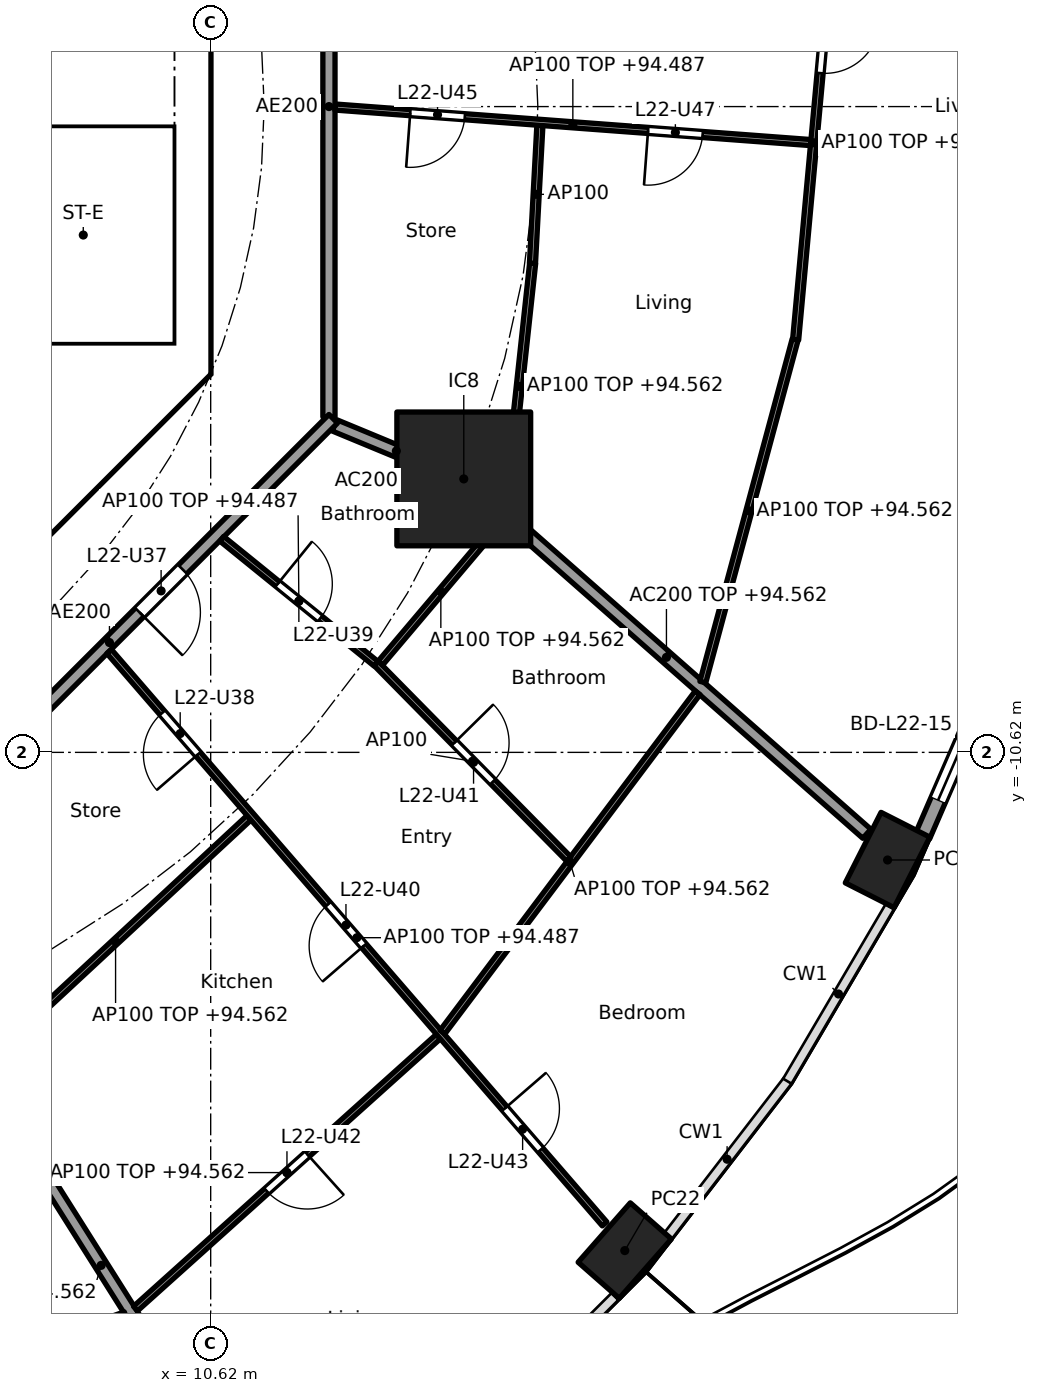
"""IFC4 building model, lengths in metres.
Left out: names, types, materials, properties, quantities, classifications, styles, units other than length and angle.
Written with IfcOpenShell. Run it as: python <this file> out.ifc"""

import sys

from ifc_helpers import new_model, si_unit, direction, frame, frame_2d, origin, origin_2d, place, context, subcontext, project, spatial, polyline, rectangle, hollow_rectangle, outline, extrude, element, fill, save


model = new_model("IFC4")
c1 = context("Model", 3, precision=1e-05, world=origin(), true_north=direction((0.0, 1.0)))
c2 = subcontext(c1, "Body", "Model", "MODEL_VIEW")
j1 = project(units=[si_unit("LENGTHUNIT", "METRE"), si_unit("PLANEANGLEUNIT", "RADIAN")], contexts=[c1])
p1 = place(None, origin())
s1 = spatial("IfcSite", under=j1, at=p1, CompositionType="ELEMENT")
p2 = place(p1, origin())
s2 = spatial("IfcBuilding", under=s1, at=p2, CompositionType="ELEMENT")
p3 = place(p2, frame((0.0, 0.0, 91.8)))
s3 = spatial("IfcBuildingStorey", under=s2, at=p3, CompositionType="ELEMENT", Elevation=91.8)
for number, where, z_axis, x_axis in (
    (1, (17.43, -18.813, 0.0), (0.0, 0.0, 1.0), (0.66, 0.751, 0.0)),
    (2, (21.751, -12.39, 0.0), (0.0, 0.0, 1.0), (0.452, 0.892, 0.0)),
):
    element("IfcColumn", number, at=place(p3, frame(where, z_axis=z_axis, x_axis=x_axis)), inside=s3, PredefinedType="COLUMN", context=c2, shape_type="SweptSolid", body=[
        extrude(hollow_rectangle(XDim=1.3, YDim=0.9, WallThickness=0.045, at=origin_2d()), origin(), (0.0, 0.0, 1.0), 3.7),
    ])
p4 = place(p3, frame((14.782, -6.123, 0.0), z_axis=(0.0, 0.0, 1.0), x_axis=(1.0, 0.0, 0.0)))
e3 = element("IfcColumn", 3, at=p4, inside=s3, PredefinedType="COLUMN", context=c2, shape_type="SweptSolid", body=[
    extrude(rectangle(XDim=2.2, YDim=2.2, at=origin_2d()), origin(), (0.0, 0.0, 1.0), 3.7),
])
p5 = place(p3, frame((23.672, -8.893, 0.0), z_axis=(0.0, 0.0, 1.0), x_axis=(-0.397621629246, -0.917549475481, 0.0)))
e4 = element("IfcWall", 4, at=p5, inside=s3, PredefinedType="SOLIDWALL", context=c2, shape_type="SweptSolid", body=[
    extrude(rectangle(XDim=3.379, YDim=0.25, at=frame_2d((1.69, 0.0))), origin(), (0.0, 0.0, 1.0), 3.44),
])
p6 = place(p5, frame((0.64, 0.0, 0.0)))
e5 = element("IfcOpeningElement", 5, at=p6, cuts=e4, PredefinedType="OPENING", context=c2, shape_type="SweptSolid", body=[
    extrude(rectangle(XDim=2.1, YDim=2.4, at=frame_2d((1.05, 1.2))), frame((0.0, 0.135, 0.0), z_axis=(0.0, -1.0, 0.0), x_axis=(1.0, 0.0, 0.0)), (0.0, 0.0, 1.0), 0.27),
])
p7 = place(p3, frame((4.613, -9.988, 0.0), z_axis=(0.0, 0.0, 1.0), x_axis=(0.707106781187, 0.707106781187, 0.0)))
e6 = element("IfcWall", 6, at=p7, inside=s3, PredefinedType="SHEAR", context=c2, shape_type="SweptSolid", body=[
    extrude(rectangle(XDim=7.602, YDim=0.6, at=frame_2d((3.801, 0.0))), origin(), (0.0, 0.0, 1.0), 3.44),
])
p8 = place(p7, frame((3.201, 0.0, 0.0)))
e7 = element("IfcOpeningElement", 7, at=p8, cuts=e6, PredefinedType="OPENING", context=c2, shape_type="SweptSolid", body=[
    extrude(rectangle(XDim=1.2, YDim=2.1, at=frame_2d((0.6, 1.05))), frame((0.0, 0.31, 0.0), z_axis=(0.0, -1.0, 0.0), x_axis=(1.0, 0.0, 0.0)), (0.0, 0.0, 1.0), 0.62),
])
p9 = place(p3, origin())
e8 = element("IfcWall", 8, at=p9, inside=s3, PredefinedType="SHEAR", context=c2, shape_type="SweptSolid", body=[
    extrude(outline(polyline([(9.776, -4.401), (10.025, -4.152), (10.025, -3.801), (10.025, 4.152), (9.776, 4.401), (10.2, 4.825), (10.625, 4.401), (10.625, -4.401), (10.2, -4.825), (9.776, -4.401)])), origin(), (0.0, 0.0, 1.0), 3.44),
])
p10 = place(p3, origin())
e9 = element("IfcWall", 9, at=p10, inside=s3, PredefinedType="SOLIDWALL", context=c2, shape_type="SweptSolid", body=[
    extrude(outline(polyline([(10.025, -4.1), (6.7, -4.1), (6.7, -3.9), (10.025, -3.9), (10.025, -4.1)])), origin(), (0.0, 0.0, 1.0), 3.44),
])
p11 = place(p3, frame((6.15, -14.824, 0.0), z_axis=(0.0, 0.0, 1.0), x_axis=(0.533492589682, -0.845804739142, 0.0)))
e10 = element("IfcWall", 10, at=p11, inside=s3, PredefinedType="PARTITIONING", context=c2, shape_type="SweptSolid", body=[
    extrude(rectangle(XDim=10.006, YDim=0.2, at=frame_2d((5.003, 0.0))), origin(), (0.0, 0.0, 1.0), 2.762),
])
p12 = place(p3, frame((12.657, -5.243, 0.0), z_axis=(0.0, 0.0, 1.0), x_axis=(0.923876145736, -0.382691608661, 0.0)))
e11 = element("IfcWall", 11, at=p12, inside=s3, PredefinedType="PARTITIONING", context=c2, shape_type="SweptSolid", body=[
    extrude(rectangle(XDim=2.2, YDim=0.2, at=frame_2d((1.1, 0.0))), origin(), (0.0, 0.0, 1.0), 3.44),
])
p13 = place(p3, frame((14.82, -6.156, 0.0), z_axis=(0.0, 0.0, 1.0), x_axis=(0.750582231659, -0.660777052808, 0.0)))
e12 = element("IfcWall", 12, at=p13, inside=s3, PredefinedType="PARTITIONING", context=c2, shape_type="SweptSolid", body=[
    extrude(rectangle(XDim=8.781, YDim=0.2, at=frame_2d((4.391, 0.0))), origin(), (0.0, 0.0, 1.0), 2.762),
])
p14 = place(p3, frame((12.565, -5.104, 0.0), z_axis=(0.0, 0.0, 1.0), x_axis=(0.0, 1.0, 0.0)))
e13 = element("IfcWall", 13, at=p14, inside=s3, PredefinedType="PARTITIONING", context=c2, shape_type="SweptSolid", body=[
    extrude(rectangle(XDim=10.209, YDim=0.2, at=frame_2d((5.104, 0.0))), origin(), (0.0, 0.0, 1.0), 3.44),
])
p15 = place(p14, frame((6.339, 0.0, 0.0)))
e14 = element("IfcOpeningElement", 14, at=p15, cuts=e13, PredefinedType="OPENING", context=c2, shape_type="SweptSolid", body=[
    extrude(rectangle(XDim=1.0, YDim=2.1, at=frame_2d((0.5, 1.05))), frame((0.0, 0.11, 0.0), z_axis=(0.0, -1.0, 0.0), x_axis=(1.0, 0.0, 0.0)), (0.0, 0.0, 1.0), 0.22),
])
p16 = place(p3, frame((5.275, -12.494, 0.0), z_axis=(0.0, 0.0, 1.0), x_axis=(0.707106781187, 0.707106781187, 0.0)))
e15 = element("IfcWall", 15, at=p16, inside=s3, PredefinedType="PARTITIONING", context=c2, shape_type="SweptSolid", body=[
    extrude(rectangle(XDim=10.409, YDim=0.2, at=frame_2d((5.205, 0.0))), origin(), (0.0, 0.0, 1.0), 3.44),
])
p17 = place(p16, frame((5.906, 0.0, 0.0)))
e16 = element("IfcOpeningElement", 16, at=p17, cuts=e15, PredefinedType="OPENING", context=c2, shape_type="SweptSolid", body=[
    extrude(rectangle(XDim=1.0, YDim=2.1, at=frame_2d((0.5, 1.05))), frame((0.0, 0.11, 0.0), z_axis=(0.0, -1.0, 0.0), x_axis=(1.0, 0.0, 0.0)), (0.0, 0.0, 1.0), 0.22),
])
p18 = place(p3, frame((20.834, 2.642, 0.0), z_axis=(0.0, 0.0, 1.0), x_axis=(-0.091385407685, -0.995815599025, 0.0)))
e17 = element("IfcWall", 17, at=p18, inside=s3, PredefinedType="PARTITIONING", context=c2, shape_type="SweptSolid", body=[
    extrude(rectangle(XDim=6.502, YDim=0.1, at=frame_2d((3.251, 0.0))), origin(), (0.0, 0.0, 1.0), 2.762),
])
p19 = place(p18, frame((1.201, 0.0, 0.0)))
e18 = element("IfcOpeningElement", 18, at=p19, cuts=e17, PredefinedType="OPENING", context=c2, shape_type="SweptSolid", body=[
    extrude(rectangle(XDim=0.9, YDim=2.1, at=frame_2d((0.45, 1.05))), frame((0.0, 0.06, 0.0), z_axis=(0.0, -1.0, 0.0), x_axis=(1.0, 0.0, 0.0)), (0.0, 0.0, 1.0), 0.12),
])
p20 = place(p3, frame((4.034, -21.698, 0.0), z_axis=(0.0, 0.0, 1.0), x_axis=(0.942861482644, 0.33318497047, 0.0)))
e19 = element("IfcWall", 19, at=p20, inside=s3, PredefinedType="PARTITIONING", context=c2, shape_type="SweptSolid", body=[
    extrude(rectangle(XDim=5.495, YDim=0.1, at=frame_2d((2.748, 0.0))), origin(), (0.0, 0.0, 1.0), 2.762),
])
p21 = place(p20, frame((2.297, 0.0, 0.0)))
e20 = element("IfcOpeningElement", 20, at=p21, cuts=e19, PredefinedType="OPENING", context=c2, shape_type="SweptSolid", body=[
    extrude(rectangle(XDim=0.9, YDim=2.1, at=frame_2d((0.45, 1.05))), frame((0.0, 0.06, 0.0), z_axis=(0.0, -1.0, 0.0), x_axis=(1.0, 0.0, 0.0)), (0.0, 0.0, 1.0), 0.12),
])
p22 = place(p3, frame((6.861, -15.768, 0.0), z_axis=(0.0, 0.0, 1.0), x_axis=(0.733011256509, 0.680216508056, 0.0)))
e21 = element("IfcWall", 21, at=p22, inside=s3, PredefinedType="PARTITIONING", context=c2, shape_type="SweptSolid", body=[
    extrude(rectangle(XDim=5.989, YDim=0.1, at=frame_2d((2.994, 0.0))), origin(), (0.0, 0.0, 1.0), 2.762),
])
p23 = place(p3, frame((9.384, -19.768, 0.0), z_axis=(0.0, 0.0, 1.0), x_axis=(0.74387407395, 0.668319805262, 0.0)))
e22 = element("IfcWall", 22, at=p23, inside=s3, PredefinedType="PARTITIONING", context=c2, shape_type="SweptSolid", body=[
    extrude(rectangle(XDim=6.695, YDim=0.1, at=frame_2d((3.348, 0.0))), origin(), (0.0, 0.0, 1.0), 2.762),
])
p24 = place(p23, frame((2.898, 0.0, 0.0)))
e23 = element("IfcOpeningElement", 23, at=p24, cuts=e22, PredefinedType="OPENING", context=c2, shape_type="SweptSolid", body=[
    extrude(rectangle(XDim=0.9, YDim=2.1, at=frame_2d((0.45, 1.05))), frame((0.0, 0.06, 0.0), z_axis=(0.0, -1.0, 0.0), x_axis=(1.0, 0.0, 0.0)), (0.0, 0.0, 1.0), 0.12),
])
p25 = place(p3, frame((8.95, -8.96, 0.0), z_axis=(0.0, 0.0, 1.0), x_axis=(0.65441081073, -0.756139200676, 0.0)))
e24 = element("IfcWall", 24, at=p25, inside=s3, PredefinedType="PARTITIONING", context=c2, shape_type="SweptSolid", body=[
    extrude(rectangle(XDim=12.451, YDim=0.1, at=frame_2d((6.226, 0.0))), origin(), (0.0, 0.0, 1.0), 2.687),
])
p26 = place(p25, frame((1.336, 0.0, 0.0)))
e25 = element("IfcOpeningElement", 25, at=p26, cuts=e24, PredefinedType="OPENING", context=c2, shape_type="SweptSolid", body=[
    extrude(rectangle(XDim=0.9, YDim=2.1, at=frame_2d((0.45, 1.05))), frame((0.0, 0.06, 0.0), z_axis=(0.0, -1.0, 0.0), x_axis=(1.0, 0.0, 0.0)), (0.0, 0.0, 1.0), 0.12),
])
p27 = place(p25, frame((5.501, 0.0, 0.0)))
e26 = element("IfcOpeningElement", 26, at=p27, cuts=e24, PredefinedType="OPENING", context=c2, shape_type="SweptSolid", body=[
    extrude(rectangle(XDim=0.9, YDim=2.1, at=frame_2d((0.45, 1.05))), frame((0.0, 0.06, 0.0), z_axis=(0.0, -1.0, 0.0), x_axis=(1.0, 0.0, 0.0)), (0.0, 0.0, 1.0), 0.12),
])
p28 = place(p25, frame((9.941, 0.0, 0.0)))
e27 = element("IfcOpeningElement", 27, at=p28, cuts=e24, PredefinedType="OPENING", context=c2, shape_type="SweptSolid", body=[
    extrude(rectangle(XDim=0.9, YDim=2.1, at=frame_2d((0.45, 1.05))), frame((0.0, 0.06, 0.0), z_axis=(0.0, -1.0, 0.0), x_axis=(1.0, 0.0, 0.0)), (0.0, 0.0, 1.0), 0.12),
])
p29 = place(p3, frame((14.432, -15.219, 0.0), z_axis=(0.0, 0.0, 1.0), x_axis=(0.601001256685, 0.799248077548, 0.0)))
e28 = element("IfcWall", 28, at=p29, inside=s3, PredefinedType="PARTITIONING", context=c2, shape_type="SweptSolid", body=[
    extrude(rectangle(XDim=6.98, YDim=0.1, at=frame_2d((3.49, 0.0))), origin(), (0.0, 0.0, 1.0), 2.762),
])
p30 = place(p3, frame((10.802, -7.107, 0.0), z_axis=(0.0, 0.0, 1.0), x_axis=(0.776992142502, -0.62951029419, 0.0)))
e29 = element("IfcWall", 29, at=p30, inside=s3, PredefinedType="PARTITIONING", context=c2, shape_type="SweptSolid", body=[
    extrude(rectangle(XDim=3.263, YDim=0.1, at=frame_2d((1.631, 0.0))), origin(), (0.0, 0.0, 1.0), 2.687),
])
p31 = place(p30, frame((1.181, 0.0, 0.0)))
e30 = element("IfcOpeningElement", 30, at=p31, cuts=e29, PredefinedType="OPENING", context=c2, shape_type="SweptSolid", body=[
    extrude(rectangle(XDim=0.9, YDim=2.1, at=frame_2d((0.45, 1.05))), frame((0.0, 0.06, 0.0), z_axis=(0.0, -1.0, 0.0), x_axis=(1.0, 0.0, 0.0)), (0.0, 0.0, 1.0), 0.12),
])
p32 = place(p3, frame((13.341, -9.157, 0.0), z_axis=(0.0, 0.0, 1.0), x_axis=(0.701624526877, -0.712546856904, 0.0)))
e31 = element("IfcWall", 31, at=p32, inside=s3, PredefinedType="PARTITIONING", context=c2, shape_type="SweptSolid", body=[
    extrude(rectangle(XDim=4.515, YDim=0.1, at=frame_2d((2.258, 0.0))), origin(), (0.0, 0.0, 1.0), 3.44),
])
p33 = place(p32, frame((1.833, 0.0, 0.0)))
e32 = element("IfcOpeningElement", 32, at=p33, cuts=e31, PredefinedType="OPENING", context=c2, shape_type="SweptSolid", body=[
    extrude(rectangle(XDim=0.9, YDim=2.1, at=frame_2d((0.45, 1.05))), frame((0.0, 0.06, 0.0), z_axis=(0.0, -1.0, 0.0), x_axis=(1.0, 0.0, 0.0)), (0.0, 0.0, 1.0), 0.12),
])
p34 = place(p3, frame((13.409, -9.155, 0.0), z_axis=(0.0, 0.0, 1.0), x_axis=(0.646130325831, 0.763227097293, 0.0)))
e33 = element("IfcWall", 33, at=p34, inside=s3, PredefinedType="PARTITIONING", context=c2, shape_type="SweptSolid", body=[
    extrude(rectangle(XDim=3.084, YDim=0.1, at=frame_2d((1.542, 0.0))), origin(), (0.0, 0.0, 1.0), 2.762),
])
p35 = place(p3, frame((15.477, -6.625, 0.0), z_axis=(0.0, 0.0, 1.0), x_axis=(0.107561928907, 0.994198386365, 0.0)))
e34 = element("IfcWall", 34, at=p35, inside=s3, PredefinedType="PARTITIONING", context=c2, shape_type="SweptSolid", body=[
    extrude(rectangle(XDim=4.072, YDim=0.1, at=frame_2d((2.036, 0.0))), origin(), (0.0, 0.0, 1.0), 2.762),
])
p36 = place(p3, frame((18.713, -9.464, 0.0), z_axis=(0.0, 0.0, 1.0), x_axis=(0.260279646259, 0.965533275316, 0.0)))
e35 = element("IfcWall", 35, at=p36, inside=s3, PredefinedType="PARTITIONING", context=c2, shape_type="SweptSolid", body=[
    extrude(rectangle(XDim=5.833, YDim=0.1, at=frame_2d((2.917, 0.0))), origin(), (0.0, 0.0, 1.0), 2.762),
])
p37 = place(p3, frame((15.912, -2.577, 0.0), z_axis=(0.0, 0.0, 1.0), x_axis=(0.053749298185, 0.998554461682, 0.0)))
e36 = element("IfcWall", 36, at=p37, inside=s3, PredefinedType="PARTITIONING", context=c2, shape_type="SweptSolid", body=[
    extrude(rectangle(XDim=2.271, YDim=0.1, at=frame_2d((1.135, 0.0))), origin(), (0.0, 0.0, 1.0), 3.44),
])
p38 = place(p3, frame((12.665, -0.008, 0.0), z_axis=(0.0, 0.0, 1.0), x_axis=(0.997222647159, -0.074478130978, 0.0)))
e37 = element("IfcWall", 37, at=p38, inside=s3, PredefinedType="PARTITIONING", context=c2, shape_type="SweptSolid", body=[
    extrude(rectangle(XDim=7.844, YDim=0.1, at=frame_2d((3.922, 0.0))), origin(), (0.0, 0.0, 1.0), 2.687),
])
p39 = place(p38, frame((1.241, 0.0, 0.0)))
e38 = element("IfcOpeningElement", 38, at=p39, cuts=e37, PredefinedType="OPENING", context=c2, shape_type="SweptSolid", body=[
    extrude(rectangle(XDim=0.9, YDim=2.1, at=frame_2d((0.45, 1.05))), frame((0.0, 0.06, 0.0), z_axis=(0.0, -1.0, 0.0), x_axis=(1.0, 0.0, 0.0)), (0.0, 0.0, 1.0), 0.12),
])
p40 = place(p38, frame((5.163, 0.0, 0.0)))
e39 = element("IfcOpeningElement", 39, at=p40, cuts=e37, PredefinedType="OPENING", context=c2, shape_type="SweptSolid", body=[
    extrude(rectangle(XDim=0.9, YDim=2.1, at=frame_2d((0.45, 1.05))), frame((0.0, 0.06, 0.0), z_axis=(0.0, -1.0, 0.0), x_axis=(1.0, 0.0, 0.0)), (0.0, 0.0, 1.0), 0.12),
])
p41 = place(p6, origin())
e40 = element("IfcDoor", 40, at=p41, inside=s3, OperationType="SLIDING_TO_LEFT", PredefinedType="DOOR", context=c2, shape_type="SweptSolid", body=[
    extrude(rectangle(XDim=2.1, YDim=2.4, at=frame_2d((1.05, 1.2))), frame((0.0, 0.025, 0.0), z_axis=(0.0, -1.0, 0.0), x_axis=(1.0, 0.0, 0.0)), (0.0, 0.0, 1.0), 0.05),
])
fill(e5, e40)
p42 = place(p17, frame((1.0, 0.0, 0.0), x_axis=(-1.0, 0.0, 0.0)))
e41 = element("IfcDoor", 41, at=p42, inside=s3, OperationType="SINGLE_SWING_RIGHT", PredefinedType="DOOR", context=c2, shape_type="SweptSolid", body=[
    extrude(rectangle(XDim=1.0, YDim=2.1, at=frame_2d((0.5, 1.05))), frame((0.0, 0.025, 0.0), z_axis=(0.0, -1.0, 0.0), x_axis=(1.0, 0.0, 0.0)), (0.0, 0.0, 1.0), 0.05),
])
fill(e16, e41)
p43 = place(p26, frame((0.9, 0.0, 0.0), x_axis=(-1.0, 0.0, 0.0)))
e42 = element("IfcDoor", 42, at=p43, inside=s3, OperationType="SINGLE_SWING_LEFT", PredefinedType="DOOR", context=c2, shape_type="SweptSolid", body=[
    extrude(rectangle(XDim=0.9, YDim=2.1, at=frame_2d((0.45, 1.05))), frame((0.0, 0.025, 0.0), z_axis=(0.0, -1.0, 0.0), x_axis=(1.0, 0.0, 0.0)), (0.0, 0.0, 1.0), 0.05),
])
fill(e25, e42)
p44 = place(p31, origin())
e43 = element("IfcDoor", 43, at=p44, inside=s3, OperationType="SINGLE_SWING_LEFT", PredefinedType="DOOR", context=c2, shape_type="SweptSolid", body=[
    extrude(rectangle(XDim=0.9, YDim=2.1, at=frame_2d((0.45, 1.05))), frame((0.0, 0.025, 0.0), z_axis=(0.0, -1.0, 0.0), x_axis=(1.0, 0.0, 0.0)), (0.0, 0.0, 1.0), 0.05),
])
fill(e30, e43)
p45 = place(p27, frame((0.9, 0.0, 0.0), x_axis=(-1.0, 0.0, 0.0)))
e44 = element("IfcDoor", 44, at=p45, inside=s3, OperationType="SINGLE_SWING_LEFT", PredefinedType="DOOR", context=c2, shape_type="SweptSolid", body=[
    extrude(rectangle(XDim=0.9, YDim=2.1, at=frame_2d((0.45, 1.05))), frame((0.0, 0.025, 0.0), z_axis=(0.0, -1.0, 0.0), x_axis=(1.0, 0.0, 0.0)), (0.0, 0.0, 1.0), 0.05),
])
fill(e26, e44)
p46 = place(p33, origin())
e45 = element("IfcDoor", 45, at=p46, inside=s3, OperationType="SINGLE_SWING_LEFT", PredefinedType="DOOR", context=c2, shape_type="SweptSolid", body=[
    extrude(rectangle(XDim=0.9, YDim=2.1, at=frame_2d((0.45, 1.05))), frame((0.0, 0.025, 0.0), z_axis=(0.0, -1.0, 0.0), x_axis=(1.0, 0.0, 0.0)), (0.0, 0.0, 1.0), 0.05),
])
fill(e32, e45)
p47 = place(p24, frame((0.9, 0.0, 0.0), x_axis=(-1.0, 0.0, 0.0)))
e46 = element("IfcDoor", 46, at=p47, inside=s3, OperationType="SINGLE_SWING_LEFT", PredefinedType="DOOR", context=c2, shape_type="SweptSolid", body=[
    extrude(rectangle(XDim=0.9, YDim=2.1, at=frame_2d((0.45, 1.05))), frame((0.0, 0.025, 0.0), z_axis=(0.0, -1.0, 0.0), x_axis=(1.0, 0.0, 0.0)), (0.0, 0.0, 1.0), 0.05),
])
fill(e23, e46)
p48 = place(p28, origin())
e47 = element("IfcDoor", 47, at=p48, inside=s3, OperationType="SINGLE_SWING_LEFT", PredefinedType="DOOR", context=c2, shape_type="SweptSolid", body=[
    extrude(rectangle(XDim=0.9, YDim=2.1, at=frame_2d((0.45, 1.05))), frame((0.0, 0.025, 0.0), z_axis=(0.0, -1.0, 0.0), x_axis=(1.0, 0.0, 0.0)), (0.0, 0.0, 1.0), 0.05),
])
fill(e27, e47)
p49 = place(p39, frame((0.9, 0.0, 0.0), x_axis=(-1.0, 0.0, 0.0)))
e48 = element("IfcDoor", 48, at=p49, inside=s3, OperationType="SINGLE_SWING_RIGHT", PredefinedType="DOOR", context=c2, shape_type="SweptSolid", body=[
    extrude(rectangle(XDim=0.9, YDim=2.1, at=frame_2d((0.45, 1.05))), frame((0.0, 0.025, 0.0), z_axis=(0.0, -1.0, 0.0), x_axis=(1.0, 0.0, 0.0)), (0.0, 0.0, 1.0), 0.05),
])
fill(e38, e48)
p50 = place(p40, frame((0.9, 0.0, 0.0), x_axis=(-1.0, 0.0, 0.0)))
e49 = element("IfcDoor", 49, at=p50, inside=s3, OperationType="SINGLE_SWING_RIGHT", PredefinedType="DOOR", context=c2, shape_type="SweptSolid", body=[
    extrude(rectangle(XDim=0.9, YDim=2.1, at=frame_2d((0.45, 1.05))), frame((0.0, 0.025, 0.0), z_axis=(0.0, -1.0, 0.0), x_axis=(1.0, 0.0, 0.0)), (0.0, 0.0, 1.0), 0.05),
])
fill(e39, e49)
p51 = place(p19, origin())
e50 = element("IfcDoor", 50, at=p51, inside=s3, OperationType="SINGLE_SWING_LEFT", PredefinedType="DOOR", context=c2, shape_type="SweptSolid", body=[
    extrude(rectangle(XDim=0.9, YDim=2.1, at=frame_2d((0.45, 1.05))), frame((0.0, 0.025, 0.0), z_axis=(0.0, -1.0, 0.0), x_axis=(1.0, 0.0, 0.0)), (0.0, 0.0, 1.0), 0.05),
])
fill(e18, e50)
save(model, sys.argv[1])
